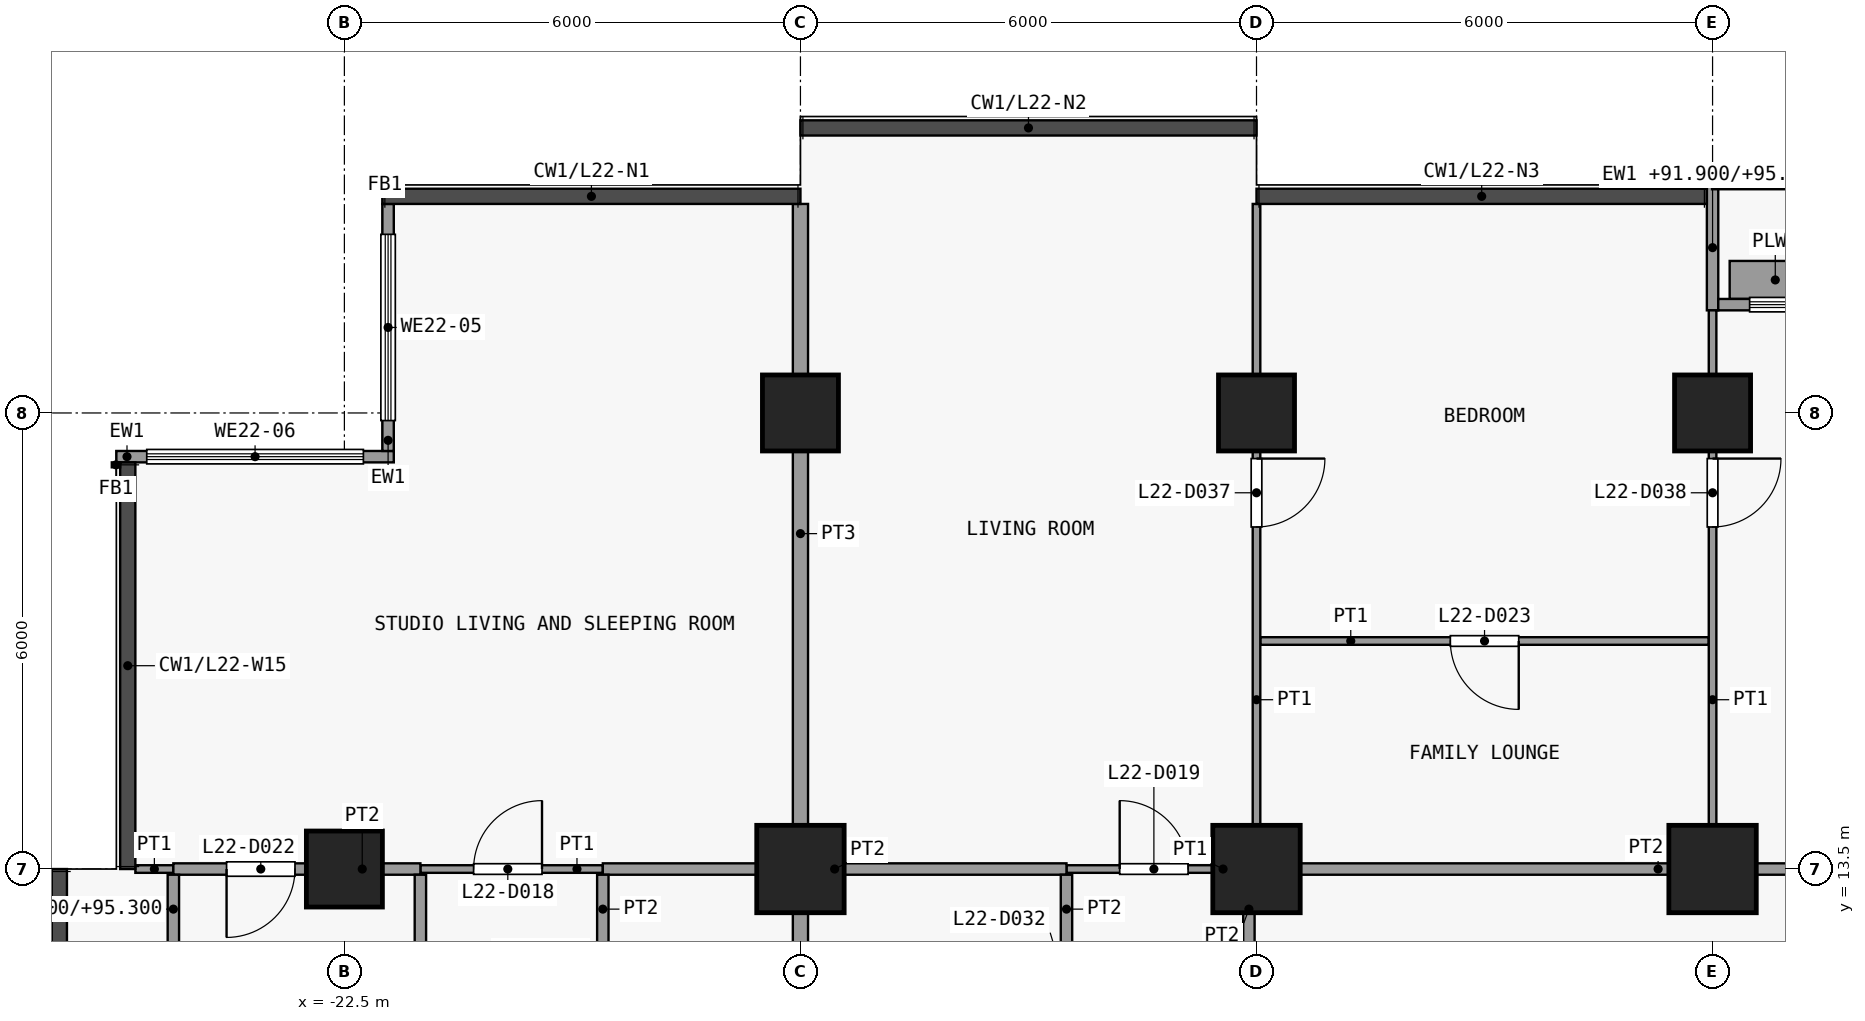
"""IFC4 building model, lengths in metres.
Left out: names, types, materials, properties, quantities, classifications, styles, units other than length and angle.
Written with IfcOpenShell. Run it as: python <this file> out.ifc"""

import sys

from ifc_helpers import new_model, si_unit, direction, frame, frame_2d, origin, origin_2d, place, context, subcontext, project, spatial, rectangle, extrude, element, fill, save


model = new_model("IFC4")
c1 = context("Model", 3, precision=1e-05, world=origin(), true_north=direction((0.0, 1.0)))
c2 = subcontext(c1, "Body", "Model", "MODEL_VIEW")
j1 = project(units=[si_unit("LENGTHUNIT", "METRE"), si_unit("PLANEANGLEUNIT", "RADIAN")], contexts=[c1])
p1 = place(None, origin())
s1 = spatial("IfcSite", under=j1, at=p1, CompositionType="ELEMENT")
p2 = place(p1, origin())
s2 = spatial("IfcBuilding", under=s1, at=p2, CompositionType="ELEMENT")
p3 = place(p2, frame((0.0, 0.0, 91.9)))
s3 = spatial("IfcBuildingStorey", under=s2, at=p3, CompositionType="ELEMENT", Elevation=91.9)
p4 = place(p3, frame((-22.5, 13.5, 0.0), z_axis=(0.0, 0.0, 1.0), x_axis=(1.0, 0.0, 0.0)))
e1 = element("IfcColumn", 1, at=p4, inside=s3, PredefinedType="COLUMN", context=c2, shape_type="SweptSolid", body=[
    extrude(rectangle(XDim=1.0, YDim=1.0, at=origin_2d()), origin(), (0.0, 0.0, 1.0), 3.6),
])
p5 = place(p3, frame((-16.5, 13.5, 0.0), z_axis=(0.0, 0.0, 1.0), x_axis=(1.0, 0.0, 0.0)))
e2 = element("IfcColumn", 2, at=p5, inside=s3, PredefinedType="COLUMN", context=c2, shape_type="SweptSolid", body=[
    extrude(rectangle(XDim=1.15, YDim=1.15, at=origin_2d()), origin(), (0.0, 0.0, 1.0), 3.6),
])
p6 = place(p3, frame((-16.5, 19.5, 0.0), z_axis=(0.0, 0.0, 1.0), x_axis=(1.0, 0.0, 0.0)))
e3 = element("IfcColumn", 3, at=p6, inside=s3, PredefinedType="COLUMN", context=c2, shape_type="SweptSolid", body=[
    extrude(rectangle(XDim=1.0, YDim=1.0, at=origin_2d()), origin(), (0.0, 0.0, 1.0), 3.6),
])
p7 = place(p3, frame((-10.5, 13.5, 0.0), z_axis=(0.0, 0.0, 1.0), x_axis=(1.0, 0.0, 0.0)))
e4 = element("IfcColumn", 4, at=p7, inside=s3, PredefinedType="COLUMN", context=c2, shape_type="SweptSolid", body=[
    extrude(rectangle(XDim=1.15, YDim=1.15, at=origin_2d()), origin(), (0.0, 0.0, 1.0), 3.6),
])
p8 = place(p3, frame((-10.5, 19.5, 0.0), z_axis=(0.0, 0.0, 1.0), x_axis=(1.0, 0.0, 0.0)))
e5 = element("IfcColumn", 5, at=p8, inside=s3, PredefinedType="COLUMN", context=c2, shape_type="SweptSolid", body=[
    extrude(rectangle(XDim=1.0, YDim=1.0, at=origin_2d()), origin(), (0.0, 0.0, 1.0), 3.6),
])
p9 = place(p3, frame((-4.5, 13.5, 0.0), z_axis=(0.0, 0.0, 1.0), x_axis=(1.0, 0.0, 0.0)))
e6 = element("IfcColumn", 6, at=p9, inside=s3, PredefinedType="COLUMN", context=c2, shape_type="SweptSolid", body=[
    extrude(rectangle(XDim=1.15, YDim=1.15, at=origin_2d()), origin(), (0.0, 0.0, 1.0), 3.6),
])
p10 = place(p3, frame((-4.5, 19.5, 0.0), z_axis=(0.0, 0.0, 1.0), x_axis=(1.0, 0.0, 0.0)))
e7 = element("IfcColumn", 7, at=p10, inside=s3, PredefinedType="COLUMN", context=c2, shape_type="SweptSolid", body=[
    extrude(rectangle(XDim=1.0, YDim=1.0, at=origin_2d()), origin(), (0.0, 0.0, 1.0), 3.6),
])
p11 = place(p3, frame((-21.925, 19.0, 0.0), z_axis=(0.0, 0.0, 1.0), x_axis=(0.0, 1.0, 0.0)))
e8 = element("IfcWall", 8, at=p11, inside=s3, PredefinedType="SOLIDWALL", context=c2, shape_type="SweptSolid", body=[
    extrude(rectangle(XDim=3.25, YDim=0.15, at=frame_2d((1.625, 0.0))), origin(), (0.0, 0.0, 1.0), 3.3),
])
p12 = place(p11, frame((0.4, 0.0, 0.9)))
e9 = element("IfcOpeningElement", 9, at=p12, cuts=e8, PredefinedType="OPENING", context=c2, shape_type="SweptSolid", body=[
    extrude(rectangle(XDim=2.45, YDim=2.4, at=frame_2d((1.225, 1.2))), frame((0.0, 0.085, 0.0), z_axis=(0.0, -1.0, 0.0), x_axis=(1.0, 0.0, 0.0)), (0.0, 0.0, 1.0), 0.17),
])
p13 = place(p3, frame((-25.5, 18.925, 0.0), z_axis=(0.0, 0.0, 1.0), x_axis=(1.0, 0.0, 0.0)))
e10 = element("IfcWall", 10, at=p13, inside=s3, PredefinedType="SOLIDWALL", context=c2, shape_type="SweptSolid", body=[
    extrude(rectangle(XDim=3.65, YDim=0.15, at=frame_2d((1.825, 0.0))), origin(), (0.0, 0.0, 1.0), 3.3),
])
p14 = place(p13, frame((0.4, 0.0, 0.9)))
e11 = element("IfcOpeningElement", 11, at=p14, cuts=e10, PredefinedType="OPENING", context=c2, shape_type="SweptSolid", body=[
    extrude(rectangle(XDim=2.85, YDim=2.4, at=frame_2d((1.425, 1.2))), frame((0.0, 0.085, 0.0), z_axis=(0.0, -1.0, 0.0), x_axis=(1.0, 0.0, 0.0)), (0.0, 0.0, 1.0), 0.17),
])
p15 = place(p3, frame((-4.5, 20.85, 0.0), z_axis=(0.0, 0.0, 1.0), x_axis=(0.0, 1.0, 0.0)))
e12 = element("IfcWall", 12, at=p15, inside=s3, PredefinedType="SOLIDWALL", context=c2, shape_type="SweptSolid", body=[
    extrude(rectangle(XDim=1.65, YDim=0.15, at=frame_2d((0.825, 0.0))), origin(), (0.0, 0.0, 1.0), 3.4),
])
p16 = place(p3, frame((-4.425, 20.925, 0.0), z_axis=(0.0, 0.0, 1.0), x_axis=(1.0, 0.0, 0.0)))
e13 = element("IfcWall", 13, at=p16, inside=s3, PredefinedType="SOLIDWALL", context=c2, shape_type="SweptSolid", body=[
    extrude(rectangle(XDim=8.85, YDim=0.15, at=frame_2d((4.425, 0.0))), origin(), (0.0, 0.0, 1.0), 3.3),
])
p17 = place(p16, frame((3.825, 0.0, 0.0)))
e14 = element("IfcOpeningElement", 14, at=p17, cuts=e13, PredefinedType="OPENING", context=c2, shape_type="SweptSolid", body=[
    extrude(rectangle(XDim=1.2, YDim=2.4, at=frame_2d((0.6, 1.2))), frame((0.0, 0.085, 0.0), z_axis=(0.0, -1.0, 0.0), x_axis=(1.0, 0.0, 0.0)), (0.0, 0.0, 1.0), 0.17),
])
p18 = place(p16, frame((0.413, 0.0, 0.9)))
e15 = element("IfcOpeningElement", 15, at=p18, cuts=e13, PredefinedType="OPENING", context=c2, shape_type="SweptSolid", body=[
    extrude(rectangle(XDim=3.0, YDim=2.1, at=frame_2d((1.5, 1.05))), frame((0.0, 0.085, 0.0), z_axis=(0.0, -1.0, 0.0), x_axis=(1.0, 0.0, 0.0)), (0.0, 0.0, 1.0), 0.17),
])
p19 = place(p16, frame((5.438, 0.0, 0.9)))
e16 = element("IfcOpeningElement", 16, at=p19, cuts=e13, PredefinedType="OPENING", context=c2, shape_type="SweptSolid", body=[
    extrude(rectangle(XDim=3.0, YDim=2.1, at=frame_2d((1.5, 1.05))), frame((0.0, 0.085, 0.0), z_axis=(0.0, -1.0, 0.0), x_axis=(1.0, 0.0, 0.0)), (0.0, 0.0, 1.0), 0.17),
])
p20 = place(p3, frame((-4.275, 21.25, 0.0), z_axis=(0.0, 0.0, 1.0), x_axis=(1.0, 0.0, 0.0)))
e17 = element("IfcWall", 17, at=p20, inside=s3, PredefinedType="USERDEFINED", context=c2, shape_type="SweptSolid", body=[
    extrude(rectangle(XDim=1.2, YDim=0.5, at=frame_2d((0.6, 0.0))), origin(), (0.0, 0.0, 1.0), 0.9),
])
p21 = place(p3, frame((-25.25, 13.5, 0.0), z_axis=(0.0, 0.0, 1.0), x_axis=(1.0, 0.0, 0.0)))
e18 = element("IfcWall", 18, at=p21, inside=s3, PredefinedType="PARTITIONING", context=c2, shape_type="SweptSolid", body=[
    extrude(rectangle(XDim=0.5, YDim=0.1, at=frame_2d((0.25, 0.0))), origin(), (0.0, 0.0, 1.0), 3.3),
])
p22 = place(p3, frame((-21.5, 13.5, 0.0), z_axis=(0.0, 0.0, 1.0), x_axis=(1.0, 0.0, 0.0)))
e19 = element("IfcWall", 19, at=p22, inside=s3, PredefinedType="PARTITIONING", context=c2, shape_type="SweptSolid", body=[
    extrude(rectangle(XDim=2.4, YDim=0.1, at=frame_2d((1.2, 0.0))), origin(), (0.0, 0.0, 1.0), 3.3),
])
p23 = place(p22, frame((0.7, 0.0, 0.0)))
e20 = element("IfcOpeningElement", 20, at=p23, cuts=e19, PredefinedType="OPENING", context=c2, shape_type="SweptSolid", body=[
    extrude(rectangle(XDim=0.9, YDim=2.1, at=frame_2d((0.45, 1.05))), frame((0.0, 0.06, 0.0), z_axis=(0.0, -1.0, 0.0), x_axis=(1.0, 0.0, 0.0)), (0.0, 0.0, 1.0), 0.12),
])
p24 = place(p3, frame((-13.0, 13.5, 0.0), z_axis=(0.0, 0.0, 1.0), x_axis=(1.0, 0.0, 0.0)))
e21 = element("IfcWall", 21, at=p24, inside=s3, PredefinedType="PARTITIONING", context=c2, shape_type="SweptSolid", body=[
    extrude(rectangle(XDim=2.4, YDim=0.1, at=frame_2d((1.2, 0.0))), origin(), (0.0, 0.0, 1.0), 3.3),
])
p25 = place(p24, frame((0.7, 0.0, 0.0)))
e22 = element("IfcOpeningElement", 22, at=p25, cuts=e21, PredefinedType="OPENING", context=c2, shape_type="SweptSolid", body=[
    extrude(rectangle(XDim=0.9, YDim=2.1, at=frame_2d((0.45, 1.05))), frame((0.0, 0.06, 0.0), z_axis=(0.0, -1.0, 0.0), x_axis=(1.0, 0.0, 0.0)), (0.0, 0.0, 1.0), 0.12),
])
p26 = place(p3, frame((-24.75, 13.5, 0.0), z_axis=(0.0, 0.0, 1.0), x_axis=(1.0, 0.0, 0.0)))
e23 = element("IfcWall", 23, at=p26, inside=s3, PredefinedType="PARTITIONING", context=c2, shape_type="SweptSolid", body=[
    extrude(rectangle(XDim=3.25, YDim=0.15, at=frame_2d((1.625, 0.0))), origin(), (0.0, 0.0, 1.0), 3.3),
])
p27 = place(p26, frame((0.7, 0.0, 0.0)))
e24 = element("IfcOpeningElement", 24, at=p27, cuts=e23, PredefinedType="OPENING", context=c2, shape_type="SweptSolid", body=[
    extrude(rectangle(XDim=0.9, YDim=2.1, at=frame_2d((0.45, 1.05))), frame((0.0, 0.085, 0.0), z_axis=(0.0, -1.0, 0.0), x_axis=(1.0, 0.0, 0.0)), (0.0, 0.0, 1.0), 0.17),
])
p28 = place(p3, frame((-19.1, 13.5, 0.0), z_axis=(0.0, 0.0, 1.0), x_axis=(1.0, 0.0, 0.0)))
e25 = element("IfcWall", 25, at=p28, inside=s3, PredefinedType="PARTITIONING", context=c2, shape_type="SweptSolid", body=[
    extrude(rectangle(XDim=6.1, YDim=0.15, at=frame_2d((3.05, 0.0))), origin(), (0.0, 0.0, 1.0), 3.3),
])
p29 = place(p3, frame((-10.5, 13.5, 0.0), z_axis=(0.0, 0.0, 1.0), x_axis=(1.0, 0.0, 0.0)))
e26 = element("IfcWall", 26, at=p29, inside=s3, PredefinedType="PARTITIONING", context=c2, shape_type="SweptSolid", body=[
    extrude(rectangle(XDim=10.567, YDim=0.15, at=frame_2d((5.283, 0.0))), origin(), (0.0, 0.0, 1.0), 3.3),
])
p30 = place(p3, frame((-10.45, 16.5, 0.0), z_axis=(0.0, 0.0, 1.0), x_axis=(1.0, 0.0, 0.0)))
e27 = element("IfcWall", 27, at=p30, inside=s3, PredefinedType="PARTITIONING", context=c2, shape_type="SweptSolid", body=[
    extrude(rectangle(XDim=5.9, YDim=0.1, at=frame_2d((2.95, 0.0))), origin(), (0.0, 0.0, 1.0), 3.3),
])
p31 = place(p30, frame((2.5, 0.0, 0.0)))
e28 = element("IfcOpeningElement", 28, at=p31, cuts=e27, PredefinedType="OPENING", context=c2, shape_type="SweptSolid", body=[
    extrude(rectangle(XDim=0.9, YDim=2.1, at=frame_2d((0.45, 1.05))), frame((0.0, 0.06, 0.0), z_axis=(0.0, -1.0, 0.0), x_axis=(1.0, 0.0, 0.0)), (0.0, 0.0, 1.0), 0.12),
])
p32 = place(p3, frame((-24.75, 10.6, 0.0), z_axis=(0.0, 0.0, 1.0), x_axis=(0.0, 1.0, 0.0)))
e29 = element("IfcWall", 29, at=p32, inside=s3, PredefinedType="PARTITIONING", context=c2, shape_type="SweptSolid", body=[
    extrude(rectangle(XDim=2.825, YDim=0.15, at=frame_2d((1.413, 0.0))), origin(), (0.0, 0.0, 1.0), 3.4),
])
p33 = place(p32, frame((0.9, 0.0, 0.0)))
e30 = element("IfcOpeningElement", 30, at=p33, cuts=e29, PredefinedType="OPENING", context=c2, shape_type="SweptSolid", body=[
    extrude(rectangle(XDim=0.9, YDim=2.1, at=frame_2d((0.45, 1.05))), frame((0.0, 0.085, 0.0), z_axis=(0.0, -1.0, 0.0), x_axis=(1.0, 0.0, 0.0)), (0.0, 0.0, 1.0), 0.17),
])
p34 = place(p3, frame((-21.5, 10.6, 0.0), z_axis=(0.0, 0.0, 1.0), x_axis=(0.0, 1.0, 0.0)))
e31 = element("IfcWall", 31, at=p34, inside=s3, PredefinedType="PARTITIONING", context=c2, shape_type="SweptSolid", body=[
    extrude(rectangle(XDim=2.825, YDim=0.15, at=frame_2d((1.413, 0.0))), origin(), (0.0, 0.0, 1.0), 3.3),
])
p35 = place(p3, frame((-19.1, 10.6, 0.0), z_axis=(0.0, 0.0, 1.0), x_axis=(0.0, 1.0, 0.0)))
e32 = element("IfcWall", 32, at=p35, inside=s3, PredefinedType="PARTITIONING", context=c2, shape_type="SweptSolid", body=[
    extrude(rectangle(XDim=2.825, YDim=0.15, at=frame_2d((1.413, 0.0))), origin(), (0.0, 0.0, 1.0), 3.3),
])
p36 = place(p35, frame((0.9, 0.0, 0.0)))
e33 = element("IfcOpeningElement", 33, at=p36, cuts=e32, PredefinedType="OPENING", context=c2, shape_type="SweptSolid", body=[
    extrude(rectangle(XDim=0.9, YDim=2.1, at=frame_2d((0.45, 1.05))), frame((0.0, 0.085, 0.0), z_axis=(0.0, -1.0, 0.0), x_axis=(1.0, 0.0, 0.0)), (0.0, 0.0, 1.0), 0.17),
])
p37 = place(p3, frame((-16.5, 10.6, 0.0), z_axis=(0.0, 0.0, 1.0), x_axis=(0.0, 1.0, 0.0)))
e34 = element("IfcWall", 34, at=p37, inside=s3, PredefinedType="PARTITIONING", context=c2, shape_type="SweptSolid", body=[
    extrude(rectangle(XDim=2.825, YDim=0.2, at=frame_2d((1.413, 0.0))), origin(), (0.0, 0.0, 1.0), 3.3),
])
p38 = place(p3, frame((-16.5, 13.575, 0.0), z_axis=(0.0, 0.0, 1.0), x_axis=(0.0, 1.0, 0.0)))
e35 = element("IfcWall", 35, at=p38, inside=s3, PredefinedType="PARTITIONING", context=c2, shape_type="SweptSolid", body=[
    extrude(rectangle(XDim=8.675, YDim=0.2, at=frame_2d((4.337, 0.0))), origin(), (0.0, 0.0, 1.0), 3.3),
])
p39 = place(p3, frame((-13.0, 10.6, 0.0), z_axis=(0.0, 0.0, 1.0), x_axis=(0.0, 1.0, 0.0)))
e36 = element("IfcWall", 36, at=p39, inside=s3, PredefinedType="PARTITIONING", context=c2, shape_type="SweptSolid", body=[
    extrude(rectangle(XDim=2.825, YDim=0.15, at=frame_2d((1.413, 0.0))), origin(), (0.0, 0.0, 1.0), 3.3),
])
p40 = place(p39, frame((0.9, 0.0, 0.0)))
e37 = element("IfcOpeningElement", 37, at=p40, cuts=e36, PredefinedType="OPENING", context=c2, shape_type="SweptSolid", body=[
    extrude(rectangle(XDim=0.9, YDim=2.1, at=frame_2d((0.45, 1.05))), frame((0.0, 0.085, 0.0), z_axis=(0.0, -1.0, 0.0), x_axis=(1.0, 0.0, 0.0)), (0.0, 0.0, 1.0), 0.17),
])
p41 = place(p3, frame((-10.6, 10.6, 0.0), z_axis=(0.0, 0.0, 1.0), x_axis=(0.0, 1.0, 0.0)))
e38 = element("IfcWall", 38, at=p41, inside=s3, PredefinedType="PARTITIONING", context=c2, shape_type="SweptSolid", body=[
    extrude(rectangle(XDim=2.825, YDim=0.15, at=frame_2d((1.413, 0.0))), origin(), (0.0, 0.0, 1.0), 3.3),
])
p42 = place(p41, frame((0.9, 0.0, 0.0)))
e39 = element("IfcOpeningElement", 39, at=p42, cuts=e38, PredefinedType="OPENING", context=c2, shape_type="SweptSolid", body=[
    extrude(rectangle(XDim=0.9, YDim=2.1, at=frame_2d((0.45, 1.05))), frame((0.0, 0.085, 0.0), z_axis=(0.0, -1.0, 0.0), x_axis=(1.0, 0.0, 0.0)), (0.0, 0.0, 1.0), 0.17),
])
p43 = place(p3, frame((-10.5, 13.575, 0.0), z_axis=(0.0, 0.0, 1.0), x_axis=(0.0, 1.0, 0.0)))
e40 = element("IfcWall", 40, at=p43, inside=s3, PredefinedType="PARTITIONING", context=c2, shape_type="SweptSolid", body=[
    extrude(rectangle(XDim=8.675, YDim=0.1, at=frame_2d((4.337, 0.0))), origin(), (0.0, 0.0, 1.0), 3.3),
])
p44 = place(p43, frame((4.425, 0.0, 0.0)))
e41 = element("IfcOpeningElement", 41, at=p44, cuts=e40, PredefinedType="OPENING", context=c2, shape_type="SweptSolid", body=[
    extrude(rectangle(XDim=0.9, YDim=2.1, at=frame_2d((0.45, 1.05))), frame((0.0, 0.06, 0.0), z_axis=(0.0, -1.0, 0.0), x_axis=(1.0, 0.0, 0.0)), (0.0, 0.0, 1.0), 0.12),
])
p45 = place(p3, frame((-4.5, 13.575, 0.0), z_axis=(0.0, 0.0, 1.0), x_axis=(0.0, 1.0, 0.0)))
e42 = element("IfcWall", 42, at=p45, inside=s3, PredefinedType="PARTITIONING", context=c2, shape_type="SweptSolid", body=[
    extrude(rectangle(XDim=7.275, YDim=0.1, at=frame_2d((3.638, 0.0))), origin(), (0.0, 0.0, 1.0), 3.3),
])
p46 = place(p45, frame((4.425, 0.0, 0.0)))
e43 = element("IfcOpeningElement", 43, at=p46, cuts=e42, PredefinedType="OPENING", context=c2, shape_type="SweptSolid", body=[
    extrude(rectangle(XDim=0.9, YDim=2.1, at=frame_2d((0.45, 1.05))), frame((0.0, 0.06, 0.0), z_axis=(0.0, -1.0, 0.0), x_axis=(1.0, 0.0, 0.0)), (0.0, 0.0, 1.0), 0.12),
])
p47 = place(p12, origin())
e44 = element("IfcWindow", 44, at=p47, inside=s3, PartitioningType="SINGLE_PANEL", PredefinedType="WINDOW", context=c2, shape_type="SweptSolid", body=[
    extrude(rectangle(XDim=2.45, YDim=2.4, at=frame_2d((1.225, 1.2))), frame((0.0, 0.03, 0.0), z_axis=(0.0, -1.0, 0.0), x_axis=(1.0, 0.0, 0.0)), (0.0, 0.0, 1.0), 0.06),
])
fill(e9, e44)
p48 = place(p14, origin())
e45 = element("IfcWindow", 45, at=p48, inside=s3, PartitioningType="SINGLE_PANEL", PredefinedType="WINDOW", context=c2, shape_type="SweptSolid", body=[
    extrude(rectangle(XDim=2.85, YDim=2.4, at=frame_2d((1.425, 1.2))), frame((0.0, 0.03, 0.0), z_axis=(0.0, -1.0, 0.0), x_axis=(1.0, 0.0, 0.0)), (0.0, 0.0, 1.0), 0.06),
])
fill(e11, e45)
p49 = place(p18, origin())
e46 = element("IfcWindow", 46, at=p49, inside=s3, PartitioningType="SINGLE_PANEL", PredefinedType="WINDOW", context=c2, shape_type="SweptSolid", body=[
    extrude(rectangle(XDim=3.0, YDim=2.1, at=frame_2d((1.5, 1.05))), frame((0.0, 0.03, 0.0), z_axis=(0.0, -1.0, 0.0), x_axis=(1.0, 0.0, 0.0)), (0.0, 0.0, 1.0), 0.06),
])
fill(e15, e46)
p50 = place(p23, origin())
e47 = element("IfcDoor", 47, at=p50, inside=s3, OperationType="SINGLE_SWING_LEFT", PredefinedType="DOOR", context=c2, shape_type="SweptSolid", body=[
    extrude(rectangle(XDim=0.9, YDim=2.1, at=frame_2d((0.45, 1.05))), frame((0.0, 0.025, 0.0), z_axis=(0.0, -1.0, 0.0), x_axis=(1.0, 0.0, 0.0)), (0.0, 0.0, 1.0), 0.05),
])
fill(e20, e47)
p51 = place(p25, origin())
e48 = element("IfcDoor", 48, at=p51, inside=s3, OperationType="SINGLE_SWING_RIGHT", PredefinedType="DOOR", context=c2, shape_type="SweptSolid", body=[
    extrude(rectangle(XDim=0.9, YDim=2.1, at=frame_2d((0.45, 1.05))), frame((0.0, 0.025, 0.0), z_axis=(0.0, -1.0, 0.0), x_axis=(1.0, 0.0, 0.0)), (0.0, 0.0, 1.0), 0.05),
])
fill(e22, e48)
p52 = place(p27, origin())
e49 = element("IfcDoor", 49, at=p52, inside=s3, OperationType="SINGLE_SWING_LEFT", PredefinedType="DOOR", context=c2, shape_type="SweptSolid", body=[
    extrude(rectangle(XDim=0.9, YDim=2.1, at=frame_2d((0.45, 1.05))), frame((0.0, 0.025, 0.0), z_axis=(0.0, -1.0, 0.0), x_axis=(1.0, 0.0, 0.0)), (0.0, 0.0, 1.0), 0.05),
])
fill(e24, e49)
p53 = place(p31, origin())
e50 = element("IfcDoor", 50, at=p53, inside=s3, OperationType="SINGLE_SWING_RIGHT", PredefinedType="DOOR", context=c2, shape_type="SweptSolid", body=[
    extrude(rectangle(XDim=0.9, YDim=2.1, at=frame_2d((0.45, 1.05))), frame((0.0, 0.025, 0.0), z_axis=(0.0, -1.0, 0.0), x_axis=(1.0, 0.0, 0.0)), (0.0, 0.0, 1.0), 0.05),
])
fill(e28, e50)
p54 = place(p44, origin())
e51 = element("IfcDoor", 51, at=p54, inside=s3, OperationType="SINGLE_SWING_RIGHT", PredefinedType="DOOR", context=c2, shape_type="SweptSolid", body=[
    extrude(rectangle(XDim=0.9, YDim=2.1, at=frame_2d((0.45, 1.05))), frame((0.0, 0.025, 0.0), z_axis=(0.0, -1.0, 0.0), x_axis=(1.0, 0.0, 0.0)), (0.0, 0.0, 1.0), 0.05),
])
fill(e41, e51)
p55 = place(p46, origin())
e52 = element("IfcDoor", 52, at=p55, inside=s3, OperationType="SINGLE_SWING_RIGHT", PredefinedType="DOOR", context=c2, shape_type="SweptSolid", body=[
    extrude(rectangle(XDim=0.9, YDim=2.1, at=frame_2d((0.45, 1.05))), frame((0.0, 0.025, 0.0), z_axis=(0.0, -1.0, 0.0), x_axis=(1.0, 0.0, 0.0)), (0.0, 0.0, 1.0), 0.05),
])
fill(e43, e52)
save(model, sys.argv[1])
